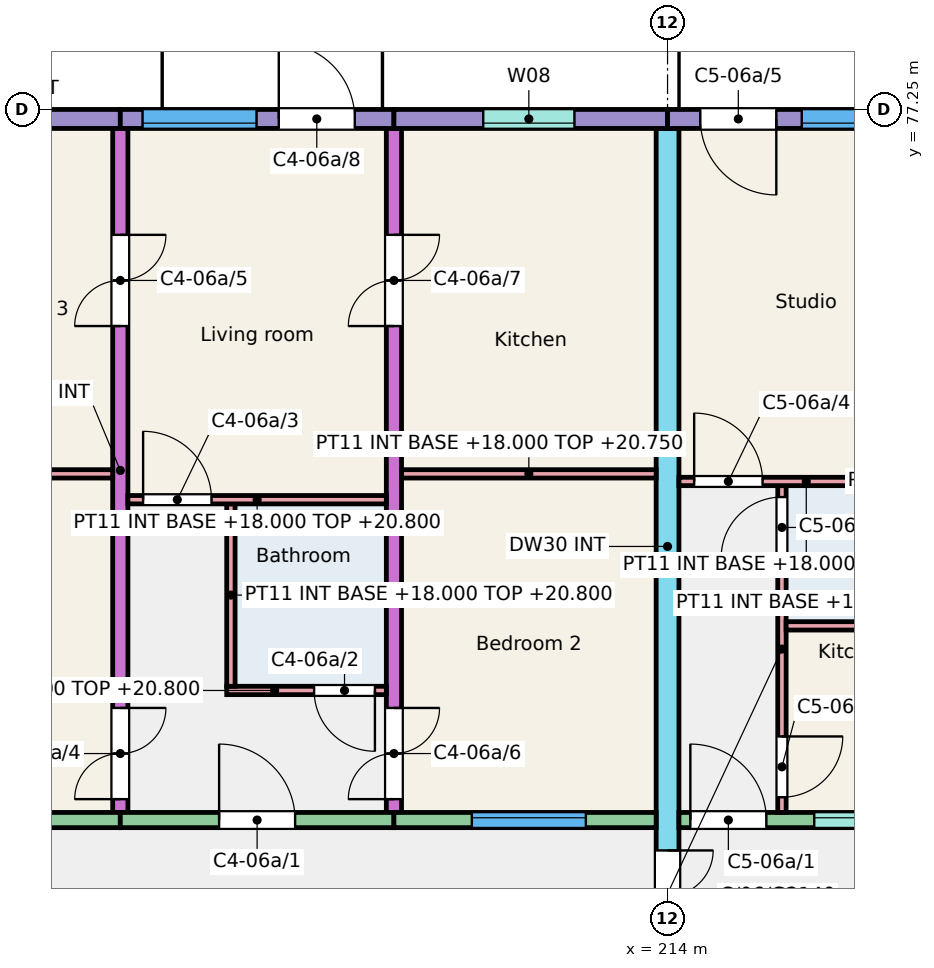
"""IFC4 building model, lengths in metres.
Left out: names, types, materials, properties, quantities, classifications, styles, units other than length and angle.
Written with IfcOpenShell. Run it as: python <this file> out.ifc"""

import sys

from ifc_helpers import new_model, si_unit, direction, frame, frame_2d, origin, place, context, subcontext, project, spatial, rectangle, extrude, element, fill, save


model = new_model("IFC4")
c1 = context("Model", 3, precision=1e-05, world=origin(), true_north=direction((0.0, 1.0)))
c2 = subcontext(c1, "Body", "Model", "MODEL_VIEW")
j1 = project(units=[si_unit("LENGTHUNIT", "METRE"), si_unit("PLANEANGLEUNIT", "RADIAN")], contexts=[c1])
p1 = place(None, origin())
s1 = spatial("IfcSite", under=j1, at=p1, CompositionType="ELEMENT")
p2 = place(p1, origin())
s2 = spatial("IfcBuilding", under=s1, at=p2, CompositionType="ELEMENT")
p3 = place(p2, frame((0.0, 0.0, 18.0)))
s3 = spatial("IfcBuildingStorey", under=s2, at=p3, CompositionType="ELEMENT", Elevation=18.0)
p4 = place(p3, frame((206.8, 68.0, 0.0), z_axis=(0.0, 0.0, 1.0), x_axis=(0.0, 1.0, 0.0)))
e1 = element("IfcWall", 1, at=p4, inside=s3, PredefinedType="SHEAR", context=c2, shape_type="SweptSolid", body=[
    extrude(rectangle(XDim=9.0, YDim=0.2, at=frame_2d((4.5, 0.0))), origin(), (0.0, 0.0, 1.0), 3.0),
])
p5 = place(p4, frame((0.175, 0.0, 0.0)))
e2 = element("IfcOpeningElement", 2, at=p5, cuts=e1, PredefinedType="OPENING", context=c2, shape_type="SweptSolid", body=[
    extrude(rectangle(XDim=1.2, YDim=2.1, at=frame_2d((0.6, 1.05))), frame((0.0, 0.11, 0.0), z_axis=(0.0, -1.0, 0.0), x_axis=(1.0, 0.0, 0.0)), (0.0, 0.0, 1.0), 0.22),
])
p6 = place(p4, frame((6.4, 0.0, 0.0)))
e3 = element("IfcOpeningElement", 3, at=p6, cuts=e1, PredefinedType="OPENING", context=c2, shape_type="SweptSolid", body=[
    extrude(rectangle(XDim=1.2, YDim=2.1, at=frame_2d((0.6, 1.05))), frame((0.0, 0.11, 0.0), z_axis=(0.0, -1.0, 0.0), x_axis=(1.0, 0.0, 0.0)), (0.0, 0.0, 1.0), 0.22),
])
p7 = place(p3, frame((210.4, 68.0, 0.0), z_axis=(0.0, 0.0, 1.0), x_axis=(0.0, 1.0, 0.0)))
e4 = element("IfcWall", 4, at=p7, inside=s3, PredefinedType="SHEAR", context=c2, shape_type="SweptSolid", body=[
    extrude(rectangle(XDim=9.0, YDim=0.2, at=frame_2d((4.5, 0.0))), origin(), (0.0, 0.0, 1.0), 3.0),
])
p8 = place(p7, frame((0.175, 0.0, 0.0)))
e5 = element("IfcOpeningElement", 5, at=p8, cuts=e4, PredefinedType="OPENING", context=c2, shape_type="SweptSolid", body=[
    extrude(rectangle(XDim=1.2, YDim=2.1, at=frame_2d((0.6, 1.05))), frame((0.0, 0.11, 0.0), z_axis=(0.0, -1.0, 0.0), x_axis=(1.0, 0.0, 0.0)), (0.0, 0.0, 1.0), 0.22),
])
p9 = place(p7, frame((6.4, 0.0, 0.0)))
e6 = element("IfcOpeningElement", 6, at=p9, cuts=e4, PredefinedType="OPENING", context=c2, shape_type="SweptSolid", body=[
    extrude(rectangle(XDim=1.2, YDim=2.1, at=frame_2d((0.6, 1.05))), frame((0.0, 0.11, 0.0), z_axis=(0.0, -1.0, 0.0), x_axis=(1.0, 0.0, 0.0)), (0.0, 0.0, 1.0), 0.22),
])
p10 = place(p3, frame((214.0, 66.0, 0.0), z_axis=(0.0, 0.0, 1.0), x_axis=(0.0, 1.0, 0.0)))
e7 = element("IfcWall", 7, at=p10, inside=s3, PredefinedType="SHEAR", context=c2, shape_type="SweptSolid", body=[
    extrude(rectangle(XDim=11.0, YDim=0.3, at=frame_2d((5.5, 0.0))), origin(), (0.0, 0.0, 1.0), 3.0),
])
p11 = place(p10, frame((0.3, 0.0, 0.0)))
e8 = element("IfcOpeningElement", 8, at=p11, cuts=e7, PredefinedType="OPENING", context=c2, shape_type="SweptSolid", body=[
    extrude(rectangle(XDim=1.2, YDim=2.1, at=frame_2d((0.6, 1.05))), frame((0.0, 0.16, 0.0), z_axis=(0.0, -1.0, 0.0), x_axis=(1.0, 0.0, 0.0)), (0.0, 0.0, 1.0), 0.32),
])
p12 = place(p3, frame((203.2, 77.125, 0.0), z_axis=(0.0, 0.0, 1.0), x_axis=(1.0, 0.0, 0.0)))
e9 = element("IfcWall", 9, at=p12, inside=s3, PredefinedType="SOLIDWALL", context=c2, shape_type="SweptSolid", body=[
    extrude(rectangle(XDim=3.6, YDim=0.25, at=frame_2d((1.8, 0.0))), origin(), (0.0, 0.0, 1.0), 3.0),
])
p13 = place(p12, frame((1.062, 0.0, 0.9)))
e10 = element("IfcOpeningElement", 10, at=p13, cuts=e9, PredefinedType="OPENING", context=c2, shape_type="SweptSolid", body=[
    extrude(rectangle(XDim=1.5, YDim=1.5, at=frame_2d((0.75, 0.75))), frame((0.0, 0.135, 0.0), z_axis=(0.0, -1.0, 0.0), x_axis=(1.0, 0.0, 0.0)), (0.0, 0.0, 1.0), 0.27),
])
p14 = place(p3, frame((203.2, 67.9, 0.0), z_axis=(0.0, 0.0, 1.0), x_axis=(1.0, 0.0, 0.0)))
e11 = element("IfcWall", 11, at=p14, inside=s3, PredefinedType="SOLIDWALL", context=c2, shape_type="SweptSolid", body=[
    extrude(rectangle(XDim=3.6, YDim=0.2, at=frame_2d((1.8, 0.0))), origin(), (0.0, 0.0, 1.0), 3.0),
])
p15 = place(p14, frame((1.062, 0.0, 0.9)))
e12 = element("IfcOpeningElement", 12, at=p15, cuts=e11, PredefinedType="OPENING", context=c2, shape_type="SweptSolid", body=[
    extrude(rectangle(XDim=1.5, YDim=1.5, at=frame_2d((0.75, 0.75))), frame((0.0, 0.11, 0.0), z_axis=(0.0, -1.0, 0.0), x_axis=(1.0, 0.0, 0.0)), (0.0, 0.0, 1.0), 0.22),
])
p16 = place(p3, frame((206.8, 77.125, 0.0), z_axis=(0.0, 0.0, 1.0), x_axis=(1.0, 0.0, 0.0)))
e13 = element("IfcWall", 13, at=p16, inside=s3, PredefinedType="SOLIDWALL", context=c2, shape_type="SweptSolid", body=[
    extrude(rectangle(XDim=3.6, YDim=0.25, at=frame_2d((1.8, 0.0))), origin(), (0.0, 0.0, 1.0), 3.0),
])
p17 = place(p16, frame((0.292, 0.0, 0.9)))
e14 = element("IfcOpeningElement", 14, at=p17, cuts=e13, PredefinedType="OPENING", context=c2, shape_type="SweptSolid", body=[
    extrude(rectangle(XDim=1.5, YDim=1.5, at=frame_2d((0.75, 0.75))), frame((0.0, 0.135, 0.0), z_axis=(0.0, -1.0, 0.0), x_axis=(1.0, 0.0, 0.0)), (0.0, 0.0, 1.0), 0.27),
])
p18 = place(p16, frame((2.085, 0.0, 0.0)))
e15 = element("IfcOpeningElement", 15, at=p18, cuts=e13, PredefinedType="OPENING", context=c2, shape_type="SweptSolid", body=[
    extrude(rectangle(XDim=1.0, YDim=2.1, at=frame_2d((0.5, 1.05))), frame((0.0, 0.135, 0.0), z_axis=(0.0, -1.0, 0.0), x_axis=(1.0, 0.0, 0.0)), (0.0, 0.0, 1.0), 0.27),
])
p19 = place(p3, frame((206.8, 67.9, 0.0), z_axis=(0.0, 0.0, 1.0), x_axis=(1.0, 0.0, 0.0)))
e16 = element("IfcWall", 16, at=p19, inside=s3, PredefinedType="SOLIDWALL", context=c2, shape_type="SweptSolid", body=[
    extrude(rectangle(XDim=3.6, YDim=0.2, at=frame_2d((1.8, 0.0))), origin(), (0.0, 0.0, 1.0), 3.0),
])
p20 = place(p19, frame((1.3, 0.0, 0.0)))
e17 = element("IfcOpeningElement", 17, at=p20, cuts=e16, PredefinedType="OPENING", context=c2, shape_type="SweptSolid", body=[
    extrude(rectangle(XDim=1.0, YDim=2.1, at=frame_2d((0.5, 1.05))), frame((0.0, 0.11, 0.0), z_axis=(0.0, -1.0, 0.0), x_axis=(1.0, 0.0, 0.0)), (0.0, 0.0, 1.0), 0.22),
])
p21 = place(p3, frame((210.4, 77.125, 0.0), z_axis=(0.0, 0.0, 1.0), x_axis=(1.0, 0.0, 0.0)))
e18 = element("IfcWall", 18, at=p21, inside=s3, PredefinedType="SOLIDWALL", context=c2, shape_type="SweptSolid", body=[
    extrude(rectangle(XDim=3.6, YDim=0.25, at=frame_2d((1.8, 0.0))), origin(), (0.0, 0.0, 1.0), 3.0),
])
p22 = place(p21, frame((1.175, 0.0, 1.1)))
e19 = element("IfcOpeningElement", 19, at=p22, cuts=e18, PredefinedType="OPENING", context=c2, shape_type="SweptSolid", body=[
    extrude(rectangle(XDim=1.2, YDim=1.3, at=frame_2d((0.6, 0.65))), frame((0.0, 0.135, 0.0), z_axis=(0.0, -1.0, 0.0), x_axis=(1.0, 0.0, 0.0)), (0.0, 0.0, 1.0), 0.27),
])
p23 = place(p3, frame((210.4, 67.9, 0.0), z_axis=(0.0, 0.0, 1.0), x_axis=(1.0, 0.0, 0.0)))
e20 = element("IfcWall", 20, at=p23, inside=s3, PredefinedType="SOLIDWALL", context=c2, shape_type="SweptSolid", body=[
    extrude(rectangle(XDim=3.45, YDim=0.2, at=frame_2d((1.725, 0.0))), origin(), (0.0, 0.0, 1.0), 3.0),
])
p24 = place(p23, frame((1.025, 0.0, 0.9)))
e21 = element("IfcOpeningElement", 21, at=p24, cuts=e20, PredefinedType="OPENING", context=c2, shape_type="SweptSolid", body=[
    extrude(rectangle(XDim=1.5, YDim=1.5, at=frame_2d((0.75, 0.75))), frame((0.0, 0.11, 0.0), z_axis=(0.0, -1.0, 0.0), x_axis=(1.0, 0.0, 0.0)), (0.0, 0.0, 1.0), 0.22),
])
p25 = place(p3, frame((214.0, 77.125, 0.0), z_axis=(0.0, 0.0, 1.0), x_axis=(1.0, 0.0, 0.0)))
e22 = element("IfcWall", 22, at=p25, inside=s3, PredefinedType="SOLIDWALL", context=c2, shape_type="SweptSolid", body=[
    extrude(rectangle(XDim=3.6, YDim=0.25, at=frame_2d((1.8, 0.0))), origin(), (0.0, 0.0, 1.0), 3.0),
])
p26 = place(p25, frame((1.765, 0.0, 0.9)))
e23 = element("IfcOpeningElement", 23, at=p26, cuts=e22, PredefinedType="OPENING", context=c2, shape_type="SweptSolid", body=[
    extrude(rectangle(XDim=1.5, YDim=1.5, at=frame_2d((0.75, 0.75))), frame((0.0, 0.135, 0.0), z_axis=(0.0, -1.0, 0.0), x_axis=(1.0, 0.0, 0.0)), (0.0, 0.0, 1.0), 0.27),
])
p27 = place(p25, frame((0.431, 0.0, 0.0)))
e24 = element("IfcOpeningElement", 24, at=p27, cuts=e22, PredefinedType="OPENING", context=c2, shape_type="SweptSolid", body=[
    extrude(rectangle(XDim=1.0, YDim=2.1, at=frame_2d((0.5, 1.05))), frame((0.0, 0.135, 0.0), z_axis=(0.0, -1.0, 0.0), x_axis=(1.0, 0.0, 0.0)), (0.0, 0.0, 1.0), 0.27),
])
p28 = place(p3, frame((214.15, 67.9, 0.0), z_axis=(0.0, 0.0, 1.0), x_axis=(1.0, 0.0, 0.0)))
e25 = element("IfcWall", 25, at=p28, inside=s3, PredefinedType="SOLIDWALL", context=c2, shape_type="SweptSolid", body=[
    extrude(rectangle(XDim=3.45, YDim=0.2, at=frame_2d((1.725, 0.0))), origin(), (0.0, 0.0, 1.0), 3.0),
])
p29 = place(p28, frame((1.78, 0.0, 1.1)))
e26 = element("IfcOpeningElement", 26, at=p29, cuts=e25, PredefinedType="OPENING", context=c2, shape_type="SweptSolid", body=[
    extrude(rectangle(XDim=1.2, YDim=1.3, at=frame_2d((0.6, 0.65))), frame((0.0, 0.11, 0.0), z_axis=(0.0, -1.0, 0.0), x_axis=(1.0, 0.0, 0.0)), (0.0, 0.0, 1.0), 0.22),
])
p30 = place(p28, frame((0.15, 0.0, 0.0)))
e27 = element("IfcOpeningElement", 27, at=p30, cuts=e25, PredefinedType="OPENING", context=c2, shape_type="SweptSolid", body=[
    extrude(rectangle(XDim=1.0, YDim=2.1, at=frame_2d((0.5, 1.05))), frame((0.0, 0.11, 0.0), z_axis=(0.0, -1.0, 0.0), x_axis=(1.0, 0.0, 0.0)), (0.0, 0.0, 1.0), 0.22),
])
p31 = place(p3, frame((208.2, 69.605, 0.0), z_axis=(0.0, 0.0, 1.0), x_axis=(1.0, 0.0, 0.0)))
e28 = element("IfcWall", 28, at=p31, inside=s3, PredefinedType="PARTITIONING", context=c2, shape_type="SweptSolid", body=[
    extrude(rectangle(XDim=2.1, YDim=0.11, at=frame_2d((1.05, 0.0))), origin(), (0.0, 0.0, 1.0), 2.8),
])
p32 = place(p31, frame((1.15, 0.0, 0.0)))
e29 = element("IfcOpeningElement", 29, at=p32, cuts=e28, PredefinedType="OPENING", context=c2, shape_type="SweptSolid", body=[
    extrude(rectangle(XDim=0.8, YDim=2.1, at=frame_2d((0.4, 1.05))), frame((0.0, 0.065, 0.0), z_axis=(0.0, -1.0, 0.0), x_axis=(1.0, 0.0, 0.0)), (0.0, 0.0, 1.0), 0.13),
])
p33 = place(p3, frame((208.255, 69.66, 0.0), z_axis=(0.0, 0.0, 1.0), x_axis=(0.0, 1.0, 0.0)))
e30 = element("IfcWall", 30, at=p33, inside=s3, PredefinedType="PARTITIONING", context=c2, shape_type="SweptSolid", body=[
    extrude(rectangle(XDim=2.4, YDim=0.11, at=frame_2d((1.2, 0.0))), origin(), (0.0, 0.0, 1.0), 2.8),
])
p34 = place(p3, frame((206.9, 72.115, 0.0), z_axis=(0.0, 0.0, 1.0), x_axis=(1.0, 0.0, 0.0)))
e31 = element("IfcWall", 31, at=p34, inside=s3, PredefinedType="PARTITIONING", context=c2, shape_type="SweptSolid", body=[
    extrude(rectangle(XDim=3.4, YDim=0.11, at=frame_2d((1.7, 0.0))), origin(), (0.0, 0.0, 1.0), 2.8),
])
p35 = place(p34, frame((0.2, 0.0, 0.0)))
e32 = element("IfcOpeningElement", 32, at=p35, cuts=e31, PredefinedType="OPENING", context=c2, shape_type="SweptSolid", body=[
    extrude(rectangle(XDim=0.9, YDim=2.1, at=frame_2d((0.45, 1.05))), frame((0.0, 0.065, 0.0), z_axis=(0.0, -1.0, 0.0), x_axis=(1.0, 0.0, 0.0)), (0.0, 0.0, 1.0), 0.13),
])
p36 = place(p3, frame((203.325, 72.455, 0.0), z_axis=(0.0, 0.0, 1.0), x_axis=(1.0, 0.0, 0.0)))
e33 = element("IfcWall", 33, at=p36, inside=s3, PredefinedType="PARTITIONING", context=c2, shape_type="SweptSolid", body=[
    extrude(rectangle(XDim=3.375, YDim=0.11, at=frame_2d((1.688, 0.0))), origin(), (0.0, 0.0, 1.0), 2.8),
])
p37 = place(p3, frame((210.5, 72.455, 0.0), z_axis=(0.0, 0.0, 1.0), x_axis=(1.0, 0.0, 0.0)))
e34 = element("IfcWall", 34, at=p37, inside=s3, PredefinedType="PARTITIONING", context=c2, shape_type="SweptSolid", body=[
    extrude(rectangle(XDim=3.35, YDim=0.11, at=frame_2d((1.675, 0.0))), origin(), (0.0, 0.0, 1.0), 2.75),
])
p38 = place(p3, frame((215.505, 68.0, 0.0), z_axis=(0.0, 0.0, 1.0), x_axis=(0.0, 1.0, 0.0)))
e35 = element("IfcWall", 35, at=p38, inside=s3, PredefinedType="PARTITIONING", context=c2, shape_type="SweptSolid", body=[
    extrude(rectangle(XDim=4.3, YDim=0.11, at=frame_2d((2.15, 0.0))), origin(), (0.0, 0.0, 1.0), 2.8),
])
p39 = place(p38, frame((0.2, 0.0, 0.0)))
e36 = element("IfcOpeningElement", 36, at=p39, cuts=e35, PredefinedType="OPENING", context=c2, shape_type="SweptSolid", body=[
    extrude(rectangle(XDim=0.8, YDim=2.1, at=frame_2d((0.4, 1.05))), frame((0.0, 0.065, 0.0), z_axis=(0.0, -1.0, 0.0), x_axis=(1.0, 0.0, 0.0)), (0.0, 0.0, 1.0), 0.13),
])
p40 = place(p38, frame((3.35, 0.0, 0.0)))
e37 = element("IfcOpeningElement", 37, at=p40, cuts=e35, PredefinedType="OPENING", context=c2, shape_type="SweptSolid", body=[
    extrude(rectangle(XDim=0.8, YDim=2.1, at=frame_2d((0.4, 1.05))), frame((0.0, 0.065, 0.0), z_axis=(0.0, -1.0, 0.0), x_axis=(1.0, 0.0, 0.0)), (0.0, 0.0, 1.0), 0.13),
])
p41 = place(p3, frame((215.56, 70.455, 0.0), z_axis=(0.0, 0.0, 1.0), x_axis=(1.0, 0.0, 0.0)))
e38 = element("IfcWall", 38, at=p41, inside=s3, PredefinedType="PARTITIONING", context=c2, shape_type="SweptSolid", body=[
    extrude(rectangle(XDim=1.94, YDim=0.11, at=frame_2d((0.97, 0.0))), origin(), (0.0, 0.0, 1.0), 2.8),
])
p42 = place(p3, frame((214.15, 72.355, 0.0), z_axis=(0.0, 0.0, 1.0), x_axis=(1.0, 0.0, 0.0)))
e39 = element("IfcWall", 39, at=p42, inside=s3, PredefinedType="PARTITIONING", context=c2, shape_type="SweptSolid", body=[
    extrude(rectangle(XDim=3.35, YDim=0.11, at=frame_2d((1.675, 0.0))), origin(), (0.0, 0.0, 1.0), 2.8),
])
p43 = place(p42, frame((0.2, 0.0, 0.0)))
e40 = element("IfcOpeningElement", 40, at=p43, cuts=e39, PredefinedType="OPENING", context=c2, shape_type="SweptSolid", body=[
    extrude(rectangle(XDim=0.9, YDim=2.1, at=frame_2d((0.45, 1.05))), frame((0.0, 0.065, 0.0), z_axis=(0.0, -1.0, 0.0), x_axis=(1.0, 0.0, 0.0)), (0.0, 0.0, 1.0), 0.13),
])
p44 = place(p24, origin())
e41 = element("IfcWindow", 41, at=p44, inside=s3, PartitioningType="SINGLE_PANEL", PredefinedType="WINDOW", context=c2, shape_type="SweptSolid", body=[
    extrude(rectangle(XDim=1.5, YDim=1.5, at=frame_2d((0.75, 0.75))), frame((0.0, 0.06, 0.0), z_axis=(0.0, -1.0, 0.0), x_axis=(1.0, 0.0, 0.0)), (0.0, 0.0, 1.0), 0.06),
])
fill(e21, e41)
p45 = place(p22, origin())
e42 = element("IfcWindow", 42, at=p45, inside=s3, PartitioningType="SINGLE_PANEL", PredefinedType="WINDOW", context=c2, shape_type="SweptSolid", body=[
    extrude(rectangle(XDim=1.2, YDim=1.3, at=frame_2d((0.6, 0.65))), frame((0.0, -0.025, 0.0), z_axis=(0.0, -1.0, 0.0), x_axis=(1.0, 0.0, 0.0)), (0.0, 0.0, 1.0), 0.06),
])
fill(e19, e42)
p46 = place(p17, origin())
e43 = element("IfcWindow", 43, at=p46, inside=s3, PartitioningType="SINGLE_PANEL", PredefinedType="WINDOW", context=c2, shape_type="SweptSolid", body=[
    extrude(rectangle(XDim=1.5, YDim=1.5, at=frame_2d((0.75, 0.75))), frame((0.0, -0.025, 0.0), z_axis=(0.0, -1.0, 0.0), x_axis=(1.0, 0.0, 0.0)), (0.0, 0.0, 1.0), 0.06),
])
fill(e14, e43)
p47 = place(p29, origin())
e44 = element("IfcWindow", 44, at=p47, inside=s3, PartitioningType="SINGLE_PANEL", PredefinedType="WINDOW", context=c2, shape_type="SweptSolid", body=[
    extrude(rectangle(XDim=1.2, YDim=1.3, at=frame_2d((0.6, 0.65))), frame((0.0, 0.06, 0.0), z_axis=(0.0, -1.0, 0.0), x_axis=(1.0, 0.0, 0.0)), (0.0, 0.0, 1.0), 0.06),
])
fill(e26, e44)
p48 = place(p26, origin())
e45 = element("IfcWindow", 45, at=p48, inside=s3, PartitioningType="SINGLE_PANEL", PredefinedType="WINDOW", context=c2, shape_type="SweptSolid", body=[
    extrude(rectangle(XDim=1.5, YDim=1.5, at=frame_2d((0.75, 0.75))), frame((0.0, -0.025, 0.0), z_axis=(0.0, -1.0, 0.0), x_axis=(1.0, 0.0, 0.0)), (0.0, 0.0, 1.0), 0.06),
])
fill(e23, e45)
p49 = place(p20, origin())
e46 = element("IfcDoor", 46, at=p49, inside=s3, OperationType="SINGLE_SWING_LEFT", PredefinedType="DOOR", context=c2, shape_type="SweptSolid", body=[
    extrude(rectangle(XDim=1.0, YDim=2.1, at=frame_2d((0.5, 1.05))), frame((0.0, 0.025, 0.0), z_axis=(0.0, -1.0, 0.0), x_axis=(1.0, 0.0, 0.0)), (0.0, 0.0, 1.0), 0.05),
])
fill(e17, e46)
p50 = place(p32, origin())
e47 = element("IfcDoor", 47, at=p50, inside=s3, OperationType="SINGLE_SWING_RIGHT", PredefinedType="DOOR", context=c2, shape_type="SweptSolid", body=[
    extrude(rectangle(XDim=0.8, YDim=2.1, at=frame_2d((0.4, 1.05))), frame((0.0, 0.025, 0.0), z_axis=(0.0, -1.0, 0.0), x_axis=(1.0, 0.0, 0.0)), (0.0, 0.0, 1.0), 0.05),
])
fill(e29, e47)
p51 = place(p35, origin())
e48 = element("IfcDoor", 48, at=p51, inside=s3, OperationType="SINGLE_SWING_LEFT", PredefinedType="DOOR", context=c2, shape_type="SweptSolid", body=[
    extrude(rectangle(XDim=0.9, YDim=2.1, at=frame_2d((0.45, 1.05))), frame((0.0, 0.025, 0.0), z_axis=(0.0, -1.0, 0.0), x_axis=(1.0, 0.0, 0.0)), (0.0, 0.0, 1.0), 0.05),
])
fill(e32, e48)
p52 = place(p5, origin())
e49 = element("IfcDoor", 49, at=p52, inside=s3, OperationType="DOUBLE_DOOR_SINGLE_SWING", PredefinedType="DOOR", context=c2, shape_type="SweptSolid", body=[
    extrude(rectangle(XDim=1.2, YDim=2.1, at=frame_2d((0.6, 1.05))), frame((0.0, 0.025, 0.0), z_axis=(0.0, -1.0, 0.0), x_axis=(1.0, 0.0, 0.0)), (0.0, 0.0, 1.0), 0.05),
])
fill(e2, e49)
p53 = place(p6, origin())
e50 = element("IfcDoor", 50, at=p53, inside=s3, OperationType="DOUBLE_DOOR_SINGLE_SWING", PredefinedType="DOOR", context=c2, shape_type="SweptSolid", body=[
    extrude(rectangle(XDim=1.2, YDim=2.1, at=frame_2d((0.6, 1.05))), frame((0.0, 0.025, 0.0), z_axis=(0.0, -1.0, 0.0), x_axis=(1.0, 0.0, 0.0)), (0.0, 0.0, 1.0), 0.05),
])
fill(e3, e50)
p54 = place(p8, origin())
e51 = element("IfcDoor", 51, at=p54, inside=s3, OperationType="DOUBLE_DOOR_SINGLE_SWING", PredefinedType="DOOR", context=c2, shape_type="SweptSolid", body=[
    extrude(rectangle(XDim=1.2, YDim=2.1, at=frame_2d((0.6, 1.05))), frame((0.0, 0.025, 0.0), z_axis=(0.0, -1.0, 0.0), x_axis=(1.0, 0.0, 0.0)), (0.0, 0.0, 1.0), 0.05),
])
fill(e5, e51)
p55 = place(p9, origin())
e52 = element("IfcDoor", 52, at=p55, inside=s3, OperationType="DOUBLE_DOOR_SINGLE_SWING", PredefinedType="DOOR", context=c2, shape_type="SweptSolid", body=[
    extrude(rectangle(XDim=1.2, YDim=2.1, at=frame_2d((0.6, 1.05))), frame((0.0, 0.025, 0.0), z_axis=(0.0, -1.0, 0.0), x_axis=(1.0, 0.0, 0.0)), (0.0, 0.0, 1.0), 0.05),
])
fill(e6, e52)
p56 = place(p18, origin())
e53 = element("IfcDoor", 53, at=p56, inside=s3, OperationType="SINGLE_SWING_LEFT", PredefinedType="DOOR", context=c2, shape_type="SweptSolid", body=[
    extrude(rectangle(XDim=1.0, YDim=2.1, at=frame_2d((0.5, 1.05))), frame((0.0, 0.025, 0.0), z_axis=(0.0, -1.0, 0.0), x_axis=(1.0, 0.0, 0.0)), (0.0, 0.0, 1.0), 0.05),
])
fill(e15, e53)
p57 = place(p30, origin())
e54 = element("IfcDoor", 54, at=p57, inside=s3, OperationType="SINGLE_SWING_LEFT", PredefinedType="DOOR", context=c2, shape_type="SweptSolid", body=[
    extrude(rectangle(XDim=1.0, YDim=2.1, at=frame_2d((0.5, 1.05))), frame((0.0, 0.025, 0.0), z_axis=(0.0, -1.0, 0.0), x_axis=(1.0, 0.0, 0.0)), (0.0, 0.0, 1.0), 0.05),
])
fill(e27, e54)
p58 = place(p39, origin())
e55 = element("IfcDoor", 55, at=p58, inside=s3, OperationType="SINGLE_SWING_RIGHT", PredefinedType="DOOR", context=c2, shape_type="SweptSolid", body=[
    extrude(rectangle(XDim=0.8, YDim=2.1, at=frame_2d((0.4, 1.05))), frame((0.0, 0.025, 0.0), z_axis=(0.0, -1.0, 0.0), x_axis=(1.0, 0.0, 0.0)), (0.0, 0.0, 1.0), 0.05),
])
fill(e36, e55)
p59 = place(p40, origin())
e56 = element("IfcDoor", 56, at=p59, inside=s3, OperationType="SINGLE_SWING_LEFT", PredefinedType="DOOR", context=c2, shape_type="SweptSolid", body=[
    extrude(rectangle(XDim=0.8, YDim=2.1, at=frame_2d((0.4, 1.05))), frame((0.0, 0.025, 0.0), z_axis=(0.0, -1.0, 0.0), x_axis=(1.0, 0.0, 0.0)), (0.0, 0.0, 1.0), 0.05),
])
fill(e37, e56)
p60 = place(p43, origin())
e57 = element("IfcDoor", 57, at=p60, inside=s3, OperationType="SINGLE_SWING_LEFT", PredefinedType="DOOR", context=c2, shape_type="SweptSolid", body=[
    extrude(rectangle(XDim=0.9, YDim=2.1, at=frame_2d((0.45, 1.05))), frame((0.0, 0.025, 0.0), z_axis=(0.0, -1.0, 0.0), x_axis=(1.0, 0.0, 0.0)), (0.0, 0.0, 1.0), 0.05),
])
fill(e40, e57)
p61 = place(p27, origin())
e58 = element("IfcDoor", 58, at=p61, inside=s3, OperationType="SINGLE_SWING_RIGHT", PredefinedType="DOOR", context=c2, shape_type="SweptSolid", body=[
    extrude(rectangle(XDim=1.0, YDim=2.1, at=frame_2d((0.5, 1.05))), frame((0.0, 0.025, 0.0), z_axis=(0.0, -1.0, 0.0), x_axis=(1.0, 0.0, 0.0)), (0.0, 0.0, 1.0), 0.05),
])
fill(e24, e58)
p62 = place(p11, origin())
e59 = element("IfcDoor", 59, at=p62, inside=s3, OperationType="DOUBLE_DOOR_SINGLE_SWING", PredefinedType="DOOR", context=c2, shape_type="SweptSolid", body=[
    extrude(rectangle(XDim=1.2, YDim=2.1, at=frame_2d((0.6, 1.05))), frame((0.0, 0.025, 0.0), z_axis=(0.0, -1.0, 0.0), x_axis=(1.0, 0.0, 0.0)), (0.0, 0.0, 1.0), 0.05),
])
fill(e8, e59)
save(model, sys.argv[1])
